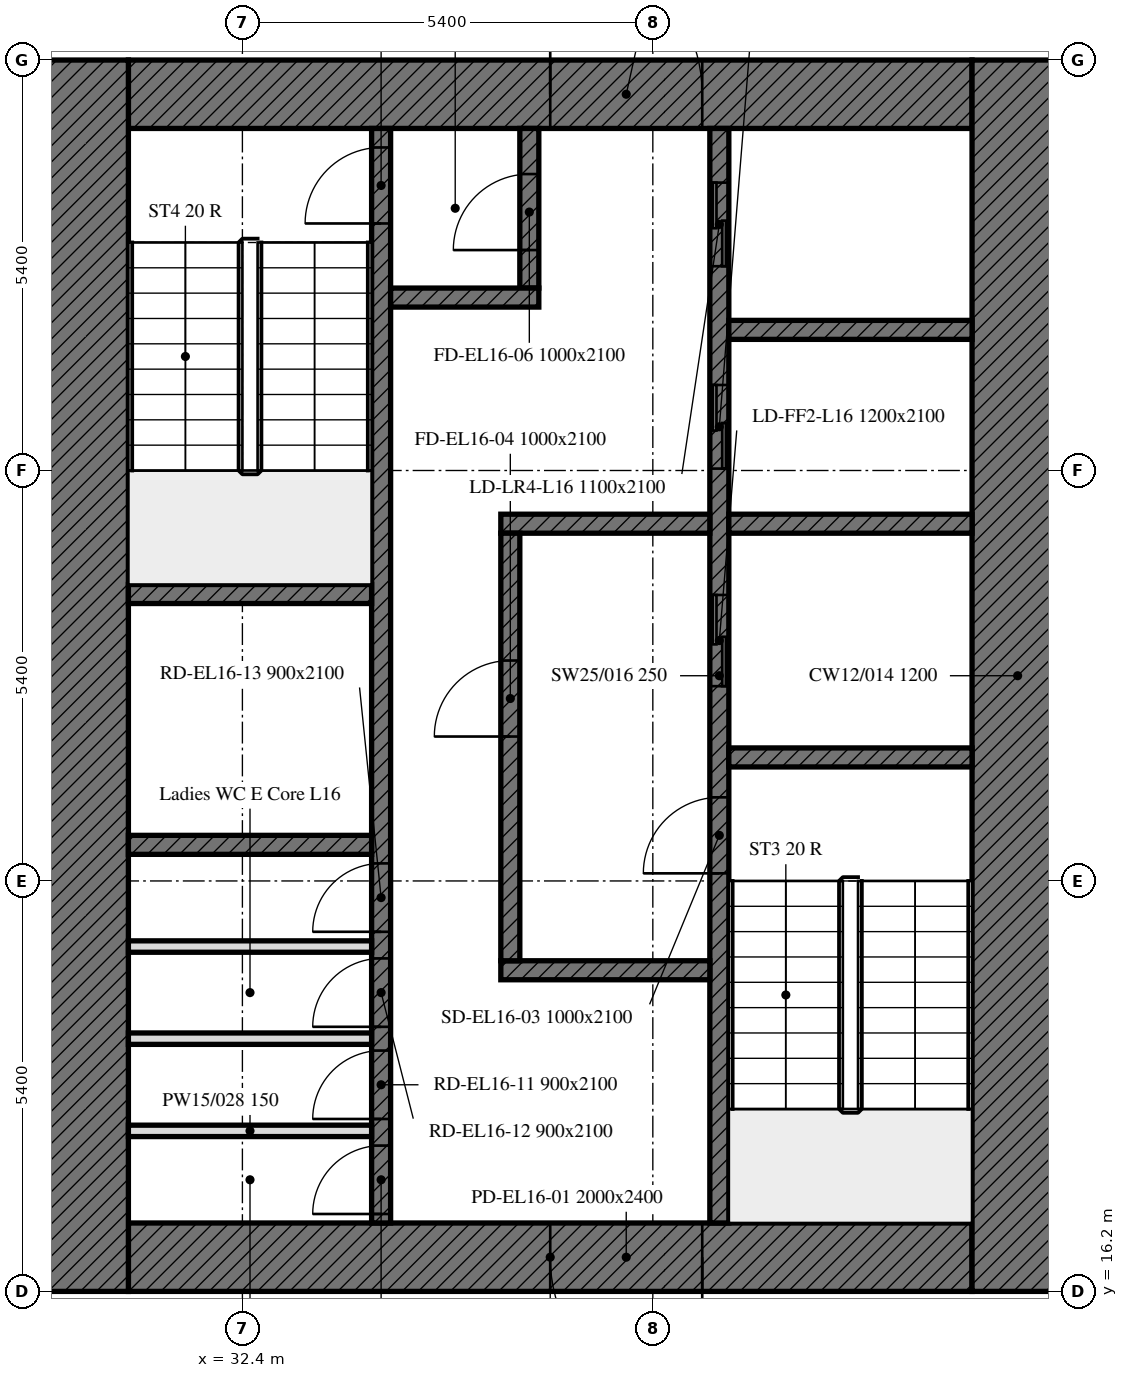
"""IFC4 building model, lengths in metres.
Left out: names, types, materials, properties, quantities, classifications, styles, units other than length and angle.
Written with IfcOpenShell. Run it as: python <this file> out.ifc"""

import sys

from ifc_helpers import new_model, si_unit, direction, frame, frame_2d, origin, place, context, subcontext, project, spatial, rectangle, extrude, element, fill, save


model = new_model("IFC4")
c1 = context("Model", 3, precision=1e-05, world=origin(), true_north=direction((0.0, 1.0)))
c2 = subcontext(c1, "Body", "Model", "MODEL_VIEW")
j1 = project(units=[si_unit("LENGTHUNIT", "METRE"), si_unit("PLANEANGLEUNIT", "RADIAN")], contexts=[c1])
p1 = place(None, origin())
s1 = spatial("IfcSite", under=j1, at=p1, CompositionType="ELEMENT")
p2 = place(p1, origin())
s2 = spatial("IfcBuilding", under=s1, at=p2, CompositionType="ELEMENT")
p3 = place(p2, frame((0.0, 0.0, 72.6)))
s3 = spatial("IfcBuildingStorey", under=s2, at=p3, CompositionType="ELEMENT", Elevation=72.6)
p4 = place(p3, frame((42.0, 16.65, 0.0), z_axis=(0.0, 0.0, 1.0), x_axis=(-1.0, 0.0, 0.0)))
e1 = element("IfcWall", 1, at=p4, inside=s3, PredefinedType="SOLIDWALL", context=c2, shape_type="SweptSolid", body=[
    extrude(rectangle(XDim=11.1, YDim=0.9, at=frame_2d((5.55, 0.0))), origin(), (0.0, 0.0, 1.0), 3.5),
])
p5 = place(p4, frame((3.55, 0.0, 0.0)))
e2 = element("IfcOpeningElement", 2, at=p5, cuts=e1, PredefinedType="OPENING", context=c2, shape_type="SweptSolid", body=[
    extrude(rectangle(XDim=2.0, YDim=2.4, at=frame_2d((1.0, 1.2))), frame((0.0, 0.45, 0.0), z_axis=(0.0, -1.0, 0.0), x_axis=(1.0, 0.0, 0.0)), (0.0, 0.0, 1.0), 0.9),
])
p6 = place(p3, frame((30.9, 31.95, 0.0), z_axis=(0.0, 0.0, 1.0), x_axis=(1.0, 0.0, 0.0)))
e3 = element("IfcWall", 3, at=p6, inside=s3, PredefinedType="SOLIDWALL", context=c2, shape_type="SweptSolid", body=[
    extrude(rectangle(XDim=11.1, YDim=0.9, at=frame_2d((5.55, 0.0))), origin(), (0.0, 0.0, 1.0), 3.5),
])
p7 = place(p6, frame((5.55, 0.0, 0.0)))
e4 = element("IfcOpeningElement", 4, at=p7, cuts=e3, PredefinedType="OPENING", context=c2, shape_type="SweptSolid", body=[
    extrude(rectangle(XDim=2.0, YDim=2.4, at=frame_2d((1.0, 1.2))), frame((0.0, 0.45, 0.0), z_axis=(0.0, -1.0, 0.0), x_axis=(1.0, 0.0, 0.0)), (0.0, 0.0, 1.0), 0.9),
])
for number, where, z_axis, x_axis in (
    (5, (42.6, 32.4, 0.0), (0.0, 0.0, 1.0), (0.0, -1.0, 0.0)),
    (6, (30.3, 16.2, 0.0), (0.0, 0.0, 1.0), (0.0, 1.0, 0.0)),
):
    element("IfcWall", number, at=place(p3, frame(where, z_axis=z_axis, x_axis=x_axis)), inside=s3, PredefinedType="SOLIDWALL", context=c2, shape_type="SweptSolid", body=[
        extrude(rectangle(XDim=16.2, YDim=1.2, at=frame_2d((8.1, 0.0))), origin(), (0.0, 0.0, 1.0), 3.5),
    ])
p8 = place(p3, frame((38.675, 17.1, 0.0), z_axis=(0.0, 0.0, 1.0), x_axis=(0.0, 1.0, 0.0)))
e7 = element("IfcWall", 7, at=p8, inside=s3, PredefinedType="SOLIDWALL", context=c2, shape_type="SweptSolid", body=[
    extrude(rectangle(XDim=14.4, YDim=0.25, at=frame_2d((7.2, 0.0))), origin(), (0.0, 0.0, 1.0), 3.5),
])
p9 = place(p8, frame((4.6, 0.0, 0.0)))
e8 = element("IfcOpeningElement", 8, at=p9, cuts=e7, PredefinedType="OPENING", context=c2, shape_type="SweptSolid", body=[
    extrude(rectangle(XDim=1.0, YDim=2.1, at=frame_2d((0.5, 1.05))), frame((0.0, 0.125, 0.0), z_axis=(0.0, -1.0, 0.0), x_axis=(1.0, 0.0, 0.0)), (0.0, 0.0, 1.0), 0.25),
])
p10 = place(p8, frame((7.062, 0.0, 0.0)))
e9 = element("IfcOpeningElement", 9, at=p10, cuts=e7, PredefinedType="OPENING", context=c2, shape_type="SweptSolid", body=[
    extrude(rectangle(XDim=1.2, YDim=2.1, at=frame_2d((0.6, 1.05))), frame((0.0, 0.125, 0.0), z_axis=(0.0, -1.0, 0.0), x_axis=(1.0, 0.0, 0.0)), (0.0, 0.0, 1.0), 0.25),
])
p11 = place(p8, frame((9.925, 0.0, 0.0)))
e10 = element("IfcOpeningElement", 10, at=p11, cuts=e7, PredefinedType="OPENING", context=c2, shape_type="SweptSolid", body=[
    extrude(rectangle(XDim=1.1, YDim=2.1, at=frame_2d((0.55, 1.05))), frame((0.0, 0.125, 0.0), z_axis=(0.0, -1.0, 0.0), x_axis=(1.0, 0.0, 0.0)), (0.0, 0.0, 1.0), 0.25),
])
p12 = place(p8, frame((12.587, 0.0, 0.0)))
e11 = element("IfcOpeningElement", 11, at=p12, cuts=e7, PredefinedType="OPENING", context=c2, shape_type="SweptSolid", body=[
    extrude(rectangle(XDim=1.1, YDim=2.1, at=frame_2d((0.55, 1.05))), frame((0.0, 0.125, 0.0), z_axis=(0.0, -1.0, 0.0), x_axis=(1.0, 0.0, 0.0)), (0.0, 0.0, 1.0), 0.25),
])
p13 = place(p3, frame((34.225, 17.1, 0.0), z_axis=(0.0, 0.0, 1.0), x_axis=(0.0, 1.0, 0.0)))
e12 = element("IfcWall", 12, at=p13, inside=s3, PredefinedType="SOLIDWALL", context=c2, shape_type="SweptSolid", body=[
    extrude(rectangle(XDim=14.4, YDim=0.25, at=frame_2d((7.2, 0.0))), origin(), (0.0, 0.0, 1.0), 3.5),
])
p14 = place(p13, frame((13.15, 0.0, 0.0)))
e13 = element("IfcOpeningElement", 13, at=p14, cuts=e12, PredefinedType="OPENING", context=c2, shape_type="SweptSolid", body=[
    extrude(rectangle(XDim=1.0, YDim=2.1, at=frame_2d((0.5, 1.05))), frame((0.0, 0.125, 0.0), z_axis=(0.0, -1.0, 0.0), x_axis=(1.0, 0.0, 0.0)), (0.0, 0.0, 1.0), 0.25),
])
p15 = place(p13, frame((0.118, 0.0, 0.0)))
e14 = element("IfcOpeningElement", 14, at=p15, cuts=e12, PredefinedType="OPENING", context=c2, shape_type="SweptSolid", body=[
    extrude(rectangle(XDim=0.9, YDim=2.1, at=frame_2d((0.45, 1.05))), frame((0.0, 0.125, 0.0), z_axis=(0.0, -1.0, 0.0), x_axis=(1.0, 0.0, 0.0)), (0.0, 0.0, 1.0), 0.25),
])
p16 = place(p13, frame((1.368, 0.0, 0.0)))
e15 = element("IfcOpeningElement", 15, at=p16, cuts=e12, PredefinedType="OPENING", context=c2, shape_type="SweptSolid", body=[
    extrude(rectangle(XDim=0.9, YDim=2.1, at=frame_2d((0.45, 1.05))), frame((0.0, 0.125, 0.0), z_axis=(0.0, -1.0, 0.0), x_axis=(1.0, 0.0, 0.0)), (0.0, 0.0, 1.0), 0.25),
])
p17 = place(p13, frame((2.581, 0.0, 0.0)))
e16 = element("IfcOpeningElement", 16, at=p17, cuts=e12, PredefinedType="OPENING", context=c2, shape_type="SweptSolid", body=[
    extrude(rectangle(XDim=0.9, YDim=2.1, at=frame_2d((0.45, 1.05))), frame((0.0, 0.125, 0.0), z_axis=(0.0, -1.0, 0.0), x_axis=(1.0, 0.0, 0.0)), (0.0, 0.0, 1.0), 0.25),
])
p18 = place(p13, frame((3.831, 0.0, 0.0)))
e17 = element("IfcOpeningElement", 17, at=p18, cuts=e12, PredefinedType="OPENING", context=c2, shape_type="SweptSolid", body=[
    extrude(rectangle(XDim=0.9, YDim=2.1, at=frame_2d((0.45, 1.05))), frame((0.0, 0.125, 0.0), z_axis=(0.0, -1.0, 0.0), x_axis=(1.0, 0.0, 0.0)), (0.0, 0.0, 1.0), 0.25),
])
p19 = place(p3, frame((38.8, 23.225, 0.0), z_axis=(0.0, 0.0, 1.0), x_axis=(1.0, 0.0, 0.0)))
e18 = element("IfcWall", 18, at=p19, inside=s3, PredefinedType="SOLIDWALL", context=c2, shape_type="SweptSolid", body=[
    extrude(rectangle(XDim=3.2, YDim=0.25, at=frame_2d((1.6, 0.0))), origin(), (0.0, 0.0, 1.0), 3.5),
])
for number, where, z_axis, x_axis in (
    (19, (30.9, 25.375, 0.0), (0.0, 0.0, 1.0), (1.0, 0.0, 0.0)),
    (20, (30.9, 22.075, 0.0), (0.0, 0.0, 1.0), (1.0, 0.0, 0.0)),
):
    element("IfcWall", number, at=place(p3, frame(where, z_axis=z_axis, x_axis=x_axis)), inside=s3, PredefinedType="SOLIDWALL", context=c2, shape_type="SweptSolid", body=[
        extrude(rectangle(XDim=3.2, YDim=0.25, at=frame_2d((1.6, 0.0))), origin(), (0.0, 0.0, 1.0), 3.5),
    ])
p20 = place(p3, frame((38.8, 26.3, 0.0), z_axis=(0.0, 0.0, 1.0), x_axis=(1.0, 0.0, 0.0)))
e21 = element("IfcWall", 21, at=p20, inside=s3, PredefinedType="SOLIDWALL", context=c2, shape_type="SweptSolid", body=[
    extrude(rectangle(XDim=3.2, YDim=0.25, at=frame_2d((1.6, 0.0))), origin(), (0.0, 0.0, 1.0), 3.5),
])
for number, where, z_axis, x_axis in (
    (22, (35.8, 26.3, 0.0), (0.0, 0.0, 1.0), (1.0, 0.0, 0.0)),
    (23, (35.8, 20.425, 0.0), (0.0, 0.0, 1.0), (1.0, 0.0, 0.0)),
):
    element("IfcWall", number, at=place(p3, frame(where, z_axis=z_axis, x_axis=x_axis)), inside=s3, PredefinedType="SOLIDWALL", context=c2, shape_type="SweptSolid", body=[
        extrude(rectangle(XDim=2.75, YDim=0.25, at=frame_2d((1.375, 0.0))), origin(), (0.0, 0.0, 1.0), 3.5),
    ])
p21 = place(p3, frame((36.175, 29.4, 0.0), z_axis=(0.0, 0.0, 1.0), x_axis=(0.0, 1.0, 0.0)))
e24 = element("IfcWall", 24, at=p21, inside=s3, PredefinedType="SOLIDWALL", context=c2, shape_type="SweptSolid", body=[
    extrude(rectangle(XDim=2.1, YDim=0.25, at=frame_2d((1.05, 0.0))), origin(), (0.0, 0.0, 1.0), 3.5),
])
p22 = place(p21, frame((0.5, 0.0, 0.0)))
e25 = element("IfcOpeningElement", 25, at=p22, cuts=e24, PredefinedType="OPENING", context=c2, shape_type="SweptSolid", body=[
    extrude(rectangle(XDim=1.0, YDim=2.1, at=frame_2d((0.5, 1.05))), frame((0.0, 0.125, 0.0), z_axis=(0.0, -1.0, 0.0), x_axis=(1.0, 0.0, 0.0)), (0.0, 0.0, 1.0), 0.25),
])
p23 = place(p3, frame((34.35, 29.275, 0.0), z_axis=(0.0, 0.0, 1.0), x_axis=(1.0, 0.0, 0.0)))
e26 = element("IfcWall", 26, at=p23, inside=s3, PredefinedType="SOLIDWALL", context=c2, shape_type="SweptSolid", body=[
    extrude(rectangle(XDim=1.95, YDim=0.25, at=frame_2d((0.975, 0.0))), origin(), (0.0, 0.0, 1.0), 3.5),
])
p24 = place(p3, frame((35.925, 20.55, 0.0), z_axis=(0.0, 0.0, 1.0), x_axis=(0.0, 1.0, 0.0)))
e27 = element("IfcWall", 27, at=p24, inside=s3, PredefinedType="SOLIDWALL", context=c2, shape_type="SweptSolid", body=[
    extrude(rectangle(XDim=5.625, YDim=0.25, at=frame_2d((2.812, 0.0))), origin(), (0.0, 0.0, 1.0), 3.5),
])
p25 = place(p24, frame((2.95, 0.0, 0.0)))
e28 = element("IfcOpeningElement", 28, at=p25, cuts=e27, PredefinedType="OPENING", context=c2, shape_type="SweptSolid", body=[
    extrude(rectangle(XDim=1.0, YDim=2.1, at=frame_2d((0.5, 1.05))), frame((0.0, 0.125, 0.0), z_axis=(0.0, -1.0, 0.0), x_axis=(1.0, 0.0, 0.0)), (0.0, 0.0, 1.0), 0.25),
])
p26 = place(p3, frame((38.8, 28.85, 0.0), z_axis=(0.0, 0.0, 1.0), x_axis=(1.0, 0.0, 0.0)))
e29 = element("IfcWall", 29, at=p26, inside=s3, PredefinedType="SOLIDWALL", context=c2, shape_type="SweptSolid", body=[
    extrude(rectangle(XDim=3.2, YDim=0.25, at=frame_2d((1.6, 0.0))), origin(), (0.0, 0.0, 1.0), 3.5),
])
for number, where, z_axis, x_axis in (
    (30, (30.9, 18.312, 0.0), (0.0, 0.0, 1.0), (1.0, 0.0, 0.0)),
    (31, (30.9, 19.525, 0.0), (0.0, 0.0, 1.0), (1.0, 0.0, 0.0)),
    (32, (30.9, 20.737, 0.0), (0.0, 0.0, 1.0), (1.0, 0.0, 0.0)),
):
    element("IfcWall", number, at=place(p3, frame(where, z_axis=z_axis, x_axis=x_axis)), inside=s3, PredefinedType="PARTITIONING", context=c2, shape_type="SweptSolid", body=[
        extrude(rectangle(XDim=3.2, YDim=0.15, at=frame_2d((1.6, 0.0))), origin(), (0.0, 0.0, 1.0), 3.5),
    ])
p27 = place(p5, origin())
e33 = element("IfcDoor", 33, at=p27, inside=s3, OperationType="DOUBLE_DOOR_SINGLE_SWING", PredefinedType="DOOR", context=c2, shape_type="SweptSolid", body=[
    extrude(rectangle(XDim=2.0, YDim=2.4, at=frame_2d((1.0, 1.2))), frame((0.0, 0.025, 0.0), z_axis=(0.0, -1.0, 0.0), x_axis=(1.0, 0.0, 0.0)), (0.0, 0.0, 1.0), 0.05),
])
fill(e2, e33)
p28 = place(p7, origin())
e34 = element("IfcDoor", 34, at=p28, inside=s3, OperationType="DOUBLE_DOOR_SINGLE_SWING", PredefinedType="DOOR", context=c2, shape_type="SweptSolid", body=[
    extrude(rectangle(XDim=2.0, YDim=2.4, at=frame_2d((1.0, 1.2))), frame((0.0, 0.025, 0.0), z_axis=(0.0, -1.0, 0.0), x_axis=(1.0, 0.0, 0.0)), (0.0, 0.0, 1.0), 0.05),
])
fill(e4, e34)
p29 = place(p9, origin())
e35 = element("IfcDoor", 35, at=p29, inside=s3, OperationType="SINGLE_SWING_LEFT", PredefinedType="DOOR", context=c2, shape_type="SweptSolid", body=[
    extrude(rectangle(XDim=1.0, YDim=2.1, at=frame_2d((0.5, 1.05))), frame((0.0, 0.025, 0.0), z_axis=(0.0, -1.0, 0.0), x_axis=(1.0, 0.0, 0.0)), (0.0, 0.0, 1.0), 0.05),
])
fill(e8, e35)
p30 = place(p25, origin())
e36 = element("IfcDoor", 36, at=p30, inside=s3, OperationType="SINGLE_SWING_LEFT", PredefinedType="DOOR", context=c2, shape_type="SweptSolid", body=[
    extrude(rectangle(XDim=1.0, YDim=2.1, at=frame_2d((0.5, 1.05))), frame((0.0, 0.025, 0.0), z_axis=(0.0, -1.0, 0.0), x_axis=(1.0, 0.0, 0.0)), (0.0, 0.0, 1.0), 0.05),
])
fill(e28, e36)
p31 = place(p14, origin())
e37 = element("IfcDoor", 37, at=p31, inside=s3, OperationType="SINGLE_SWING_LEFT", PredefinedType="DOOR", context=c2, shape_type="SweptSolid", body=[
    extrude(rectangle(XDim=1.0, YDim=2.1, at=frame_2d((0.5, 1.05))), frame((0.0, 0.025, 0.0), z_axis=(0.0, -1.0, 0.0), x_axis=(1.0, 0.0, 0.0)), (0.0, 0.0, 1.0), 0.05),
])
fill(e13, e37)
p32 = place(p22, origin())
e38 = element("IfcDoor", 38, at=p32, inside=s3, OperationType="SINGLE_SWING_LEFT", PredefinedType="DOOR", context=c2, shape_type="SweptSolid", body=[
    extrude(rectangle(XDim=1.0, YDim=2.1, at=frame_2d((0.5, 1.05))), frame((0.0, 0.025, 0.0), z_axis=(0.0, -1.0, 0.0), x_axis=(1.0, 0.0, 0.0)), (0.0, 0.0, 1.0), 0.05),
])
fill(e25, e38)
p33 = place(p10, origin())
e39 = element("IfcDoor", 39, at=p33, inside=s3, OperationType="DOUBLE_DOOR_SLIDING", PredefinedType="DOOR", context=c2, shape_type="SweptSolid", body=[
    extrude(rectangle(XDim=1.2, YDim=2.1, at=frame_2d((0.6, 1.05))), frame((0.0, 0.025, 0.0), z_axis=(0.0, -1.0, 0.0), x_axis=(1.0, 0.0, 0.0)), (0.0, 0.0, 1.0), 0.05),
])
fill(e9, e39)
p34 = place(p11, origin())
e40 = element("IfcDoor", 40, at=p34, inside=s3, OperationType="DOUBLE_DOOR_SLIDING", PredefinedType="DOOR", context=c2, shape_type="SweptSolid", body=[
    extrude(rectangle(XDim=1.1, YDim=2.1, at=frame_2d((0.55, 1.05))), frame((0.0, 0.025, 0.0), z_axis=(0.0, -1.0, 0.0), x_axis=(1.0, 0.0, 0.0)), (0.0, 0.0, 1.0), 0.05),
])
fill(e10, e40)
p35 = place(p12, origin())
e41 = element("IfcDoor", 41, at=p35, inside=s3, OperationType="DOUBLE_DOOR_SLIDING", PredefinedType="DOOR", context=c2, shape_type="SweptSolid", body=[
    extrude(rectangle(XDim=1.1, YDim=2.1, at=frame_2d((0.55, 1.05))), frame((0.0, 0.025, 0.0), z_axis=(0.0, -1.0, 0.0), x_axis=(1.0, 0.0, 0.0)), (0.0, 0.0, 1.0), 0.05),
])
fill(e11, e41)
p36 = place(p15, origin())
e42 = element("IfcDoor", 42, at=p36, inside=s3, OperationType="SINGLE_SWING_LEFT", PredefinedType="DOOR", context=c2, shape_type="SweptSolid", body=[
    extrude(rectangle(XDim=0.9, YDim=2.1, at=frame_2d((0.45, 1.05))), frame((0.0, 0.025, 0.0), z_axis=(0.0, -1.0, 0.0), x_axis=(1.0, 0.0, 0.0)), (0.0, 0.0, 1.0), 0.05),
])
fill(e14, e42)
p37 = place(p16, origin())
e43 = element("IfcDoor", 43, at=p37, inside=s3, OperationType="SINGLE_SWING_LEFT", PredefinedType="DOOR", context=c2, shape_type="SweptSolid", body=[
    extrude(rectangle(XDim=0.9, YDim=2.1, at=frame_2d((0.45, 1.05))), frame((0.0, 0.025, 0.0), z_axis=(0.0, -1.0, 0.0), x_axis=(1.0, 0.0, 0.0)), (0.0, 0.0, 1.0), 0.05),
])
fill(e15, e43)
p38 = place(p17, origin())
e44 = element("IfcDoor", 44, at=p38, inside=s3, OperationType="SINGLE_SWING_LEFT", PredefinedType="DOOR", context=c2, shape_type="SweptSolid", body=[
    extrude(rectangle(XDim=0.9, YDim=2.1, at=frame_2d((0.45, 1.05))), frame((0.0, 0.025, 0.0), z_axis=(0.0, -1.0, 0.0), x_axis=(1.0, 0.0, 0.0)), (0.0, 0.0, 1.0), 0.05),
])
fill(e16, e44)
p39 = place(p18, origin())
e45 = element("IfcDoor", 45, at=p39, inside=s3, OperationType="SINGLE_SWING_LEFT", PredefinedType="DOOR", context=c2, shape_type="SweptSolid", body=[
    extrude(rectangle(XDim=0.9, YDim=2.1, at=frame_2d((0.45, 1.05))), frame((0.0, 0.025, 0.0), z_axis=(0.0, -1.0, 0.0), x_axis=(1.0, 0.0, 0.0)), (0.0, 0.0, 1.0), 0.05),
])
fill(e17, e45)
save(model, sys.argv[1])
